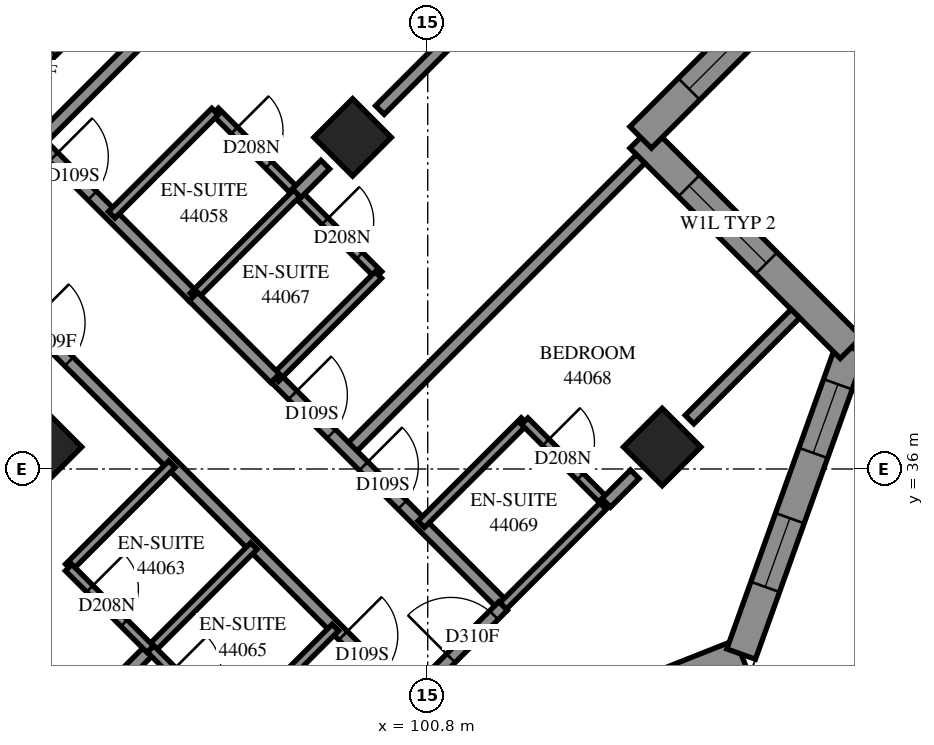
"""IFC4 building model, lengths in metres.
Left out: names, types, materials, properties, quantities, classifications, styles, units other than length and angle.
Written with IfcOpenShell. Run it as: python <this file> out.ifc"""

import sys

from ifc_helpers import new_model, si_unit, direction, frame, frame_2d, origin, origin_2d, place, context, subcontext, project, spatial, polyline, rectangle, outline, extrude, element, fill, save


model = new_model("IFC4")
c1 = context("Model", 3, precision=1e-05, world=origin(), true_north=direction((0.0, 1.0)))
c2 = subcontext(c1, "Body", "Model", "MODEL_VIEW")
j1 = project(units=[si_unit("LENGTHUNIT", "METRE"), si_unit("PLANEANGLEUNIT", "RADIAN")], contexts=[c1])
p1 = place(None, origin())
s1 = spatial("IfcSite", under=j1, at=p1, CompositionType="ELEMENT")
p2 = place(p1, origin())
s2 = spatial("IfcBuilding", under=s1, at=p2, CompositionType="ELEMENT")
p3 = place(p2, frame((0.0, 0.0, 162.6)))
s3 = spatial("IfcBuildingStorey", under=s2, at=p3, CompositionType="ELEMENT", Elevation=162.6)
for number, where, z_axis, x_axis in (
    (1, (99.565, 41.453, 0.0), (0.0, 0.0, 1.0), (0.707, -0.707, 0.0)),
    (2, (94.474, 36.362, 0.0), (0.0, 0.0, 1.0), (0.707, -0.707, 0.0)),
    (3, (104.656, 36.362, 0.0), (0.0, 0.0, 1.0), (0.707, -0.707, 0.0)),
):
    element("IfcColumn", number, at=place(p3, frame(where, z_axis=z_axis, x_axis=x_axis)), inside=s3, PredefinedType="COLUMN", context=c2, shape_type="SweptSolid", body=[
        extrude(rectangle(XDim=0.9, YDim=0.9, at=origin_2d()), origin(), (0.0, 0.0, 1.0), 3.1),
    ])
p4 = place(p3, frame((87.049, 38.695, -0.3), z_axis=(0.0, 0.0, 1.0), x_axis=(0.7071067812, 0.7071067812, 0.0)))
e4 = element("IfcWall", 4, at=p4, inside=s3, PredefinedType="SHEAR", context=c2, shape_type="SweptSolid", body=[
    extrude(rectangle(XDim=14.4, YDim=0.6, at=frame_2d((7.2, 0.0))), origin(), (0.0, 0.0, 1.0), 2.7),
])
p5 = place(p4, frame((4.55, 0.0, 0.3)))
e5 = element("IfcOpeningElement", 5, at=p5, cuts=e4, PredefinedType="OPENING", context=c2, shape_type="SweptSolid", body=[
    extrude(rectangle(XDim=1.1, YDim=2.1, at=frame_2d((0.55, 1.05))), frame((0.0, 0.31, 0.0), z_axis=(0.0, -1.0, 0.0), x_axis=(1.0, 0.0, 0.0)), (0.0, 0.0, 1.0), 0.62),
])
p6 = place(p4, frame((11.35, 0.0, 0.3)))
e6 = element("IfcOpeningElement", 6, at=p6, cuts=e4, PredefinedType="OPENING", context=c2, shape_type="SweptSolid", body=[
    extrude(rectangle(XDim=1.1, YDim=2.1, at=frame_2d((0.55, 1.05))), frame((0.0, 0.31, 0.0), z_axis=(0.0, -1.0, 0.0), x_axis=(1.0, 0.0, 0.0)), (0.0, 0.0, 1.0), 0.62),
])
p7 = place(p3, frame((100.807, 30.918, 0.0), z_axis=(0.0, 0.0, 1.0), x_axis=(0.9297320298, 0.3682368161, 0.0)))
e7 = element("IfcWall", 7, at=p7, inside=s3, PredefinedType="SOLIDWALL", context=c2, shape_type="SweptSolid", body=[
    extrude(outline(polyline([(0.108, -0.25), (5.649, -0.25), (5.423, 0.25), (-0.108, 0.25), (0.108, -0.25)])), origin(), (0.0, 0.0, 1.0), 3.1),
])
p8 = place(p7, frame((0.632, 0.0, 0.45)))
e8 = element("IfcOpeningElement", 8, at=p8, cuts=e7, PredefinedType="OPENING", context=c2, shape_type="SweptSolid", body=[
    extrude(rectangle(XDim=2.8, YDim=2.5, at=frame_2d((1.4, 1.25))), frame((0.0, 0.26, 0.0), z_axis=(0.0, -1.0, 0.0), x_axis=(1.0, 0.0, 0.0)), (0.0, 0.0, 1.0), 0.52),
])
p9 = place(p3, frame((105.954, 32.957, 0.0), z_axis=(0.0, 0.0, 1.0), x_axis=(0.3376937102, 0.9412560534, 0.0)))
e9 = element("IfcWall", 9, at=p9, inside=s3, PredefinedType="SOLIDWALL", context=c2, shape_type="SweptSolid", body=[
    extrude(outline(polyline([(-0.113, -0.25), (5.51, -0.25), (5.193, 0.25), (0.113, 0.25), (-0.113, -0.25)])), origin(), (0.0, 0.0, 1.0), 3.1),
])
p10 = place(p9, frame((1.173, 0.0, 0.45)))
e10 = element("IfcOpeningElement", 10, at=p10, cuts=e9, PredefinedType="OPENING", context=c2, shape_type="SweptSolid", body=[
    extrude(rectangle(XDim=1.2, YDim=2.5, at=frame_2d((0.6, 1.25))), frame((0.0, 0.26, 0.0), z_axis=(0.0, -1.0, 0.0), x_axis=(1.0, 0.0, 0.0)), (0.0, 0.0, 1.0), 0.52),
])
p11 = place(p9, frame((3.513, 0.0, 0.45)))
e11 = element("IfcOpeningElement", 11, at=p11, cuts=e9, PredefinedType="OPENING", context=c2, shape_type="SweptSolid", body=[
    extrude(rectangle(XDim=1.2, YDim=2.5, at=frame_2d((0.6, 1.25))), frame((0.0, 0.26, 0.0), z_axis=(0.0, -1.0, 0.0), x_axis=(1.0, 0.0, 0.0)), (0.0, 0.0, 1.0), 0.52),
])
p12 = place(p3, frame((107.761, 37.994, 0.0), z_axis=(0.0, 0.0, 1.0), x_axis=(-0.707127224, 0.7070863378, 0.0)))
e12 = element("IfcWall", 12, at=p12, inside=s3, PredefinedType="SOLIDWALL", context=c2, shape_type="SweptSolid", body=[
    extrude(outline(polyline([(-0.159, -0.25), (4.642, -0.25), (5.142, 0.25), (0.159, 0.25), (-0.159, -0.25)])), origin(), (0.0, 0.0, 1.0), 3.1),
])
p13 = place(p12, frame((1.967, 0.0, 0.6)))
e13 = element("IfcOpeningElement", 13, at=p13, cuts=e12, PredefinedType="OPENING", context=c2, shape_type="SweptSolid", body=[
    extrude(rectangle(XDim=1.8, YDim=1.9, at=frame_2d((0.9, 0.95))), frame((0.0, 0.26, 0.0), z_axis=(0.0, -1.0, 0.0), x_axis=(1.0, 0.0, 0.0)), (0.0, 0.0, 1.0), 0.52),
])
p14 = place(p3, frame((104.302, 41.453, 0.0), z_axis=(0.0, 0.0, 1.0), x_axis=(0.7071153373, 0.707098225, 0.0)))
e14 = element("IfcWall", 14, at=p14, inside=s3, PredefinedType="SOLIDWALL", context=c2, shape_type="SweptSolid", body=[
    extrude(outline(polyline([(0.25, -0.25), (6.192, -0.25), (5.495, 0.25), (-0.25, 0.25), (0.25, -0.25)])), origin(), (0.0, 0.0, 1.0), 3.1),
])
p15 = place(p14, frame((1.125, 0.0, 0.6)))
e15 = element("IfcOpeningElement", 15, at=p15, cuts=e14, PredefinedType="OPENING", context=c2, shape_type="SweptSolid", body=[
    extrude(rectangle(XDim=1.8, YDim=1.9, at=frame_2d((0.9, 0.95))), frame((0.0, 0.26, 0.0), z_axis=(0.0, -1.0, 0.0), x_axis=(1.0, 0.0, 0.0)), (0.0, 0.0, 1.0), 0.52),
])
p16 = place(p14, frame((3.973, 0.0, 0.6)))
e16 = element("IfcOpeningElement", 16, at=p16, cuts=e14, PredefinedType="OPENING", context=c2, shape_type="SweptSolid", body=[
    extrude(rectangle(XDim=1.2, YDim=1.9, at=frame_2d((0.6, 0.95))), frame((0.0, 0.26, 0.0), z_axis=(0.0, -1.0, 0.0), x_axis=(1.0, 0.0, 0.0)), (0.0, 0.0, 1.0), 0.52),
])
p17 = place(p3, frame((94.401, 41.383, 0.0), z_axis=(0.0, 0.0, 1.0), x_axis=(0.7071067812, 0.7071067812, 0.0)))
e17 = element("IfcWall", 17, at=p17, inside=s3, PredefinedType="PARTITIONING", context=c2, shape_type="SweptSolid", body=[
    extrude(rectangle(XDim=12.066, YDim=0.2, at=frame_2d((6.033, 0.0))), origin(), (0.0, 0.0, 1.0), 3.1),
])
p18 = place(p3, frame((92.209, 40.459, 0.0), z_axis=(0.0, 0.0, 1.0), x_axis=(0.7071067812, -0.7071067812, 0.0)))
e18 = element("IfcWall", 18, at=p18, inside=s3, PredefinedType="PARTITIONING", context=c2, shape_type="SweptSolid", body=[
    extrude(rectangle(XDim=11.698, YDim=0.2, at=frame_2d((5.849, 0.0))), origin(), (0.0, 0.0, 1.0), 3.1),
])
p19 = place(p18, frame((2.908, 0.0, 0.0)))
e19 = element("IfcOpeningElement", 19, at=p19, cuts=e18, PredefinedType="OPENING", context=c2, shape_type="SweptSolid", body=[
    extrude(rectangle(XDim=0.9, YDim=2.1, at=frame_2d((0.45, 1.05))), frame((0.0, 0.11, 0.0), z_axis=(0.0, -1.0, 0.0), x_axis=(1.0, 0.0, 0.0)), (0.0, 0.0, 1.0), 0.22),
])
p20 = place(p18, frame((10.181, 0.0, 0.0)))
e20 = element("IfcOpeningElement", 20, at=p20, cuts=e18, PredefinedType="OPENING", context=c2, shape_type="SweptSolid", body=[
    extrude(rectangle(XDim=0.9, YDim=2.1, at=frame_2d((0.45, 1.05))), frame((0.0, 0.11, 0.0), z_axis=(0.0, -1.0, 0.0), x_axis=(1.0, 0.0, 0.0)), (0.0, 0.0, 1.0), 0.22),
])
p21 = place(p3, frame((93.767, 42.021, 0.0), z_axis=(0.0, 0.0, 1.0), x_axis=(0.7071067812, 0.7071067812, 0.0)))
e21 = element("IfcWall", 21, at=p21, inside=s3, PredefinedType="PARTITIONING", context=c2, shape_type="SweptSolid", body=[
    extrude(rectangle(XDim=9.998, YDim=0.2, at=frame_2d((4.999, 0.0))), origin(), (0.0, 0.0, 1.0), 3.1),
])
p22 = place(p21, frame((0.196, 0.0, 0.0)))
e22 = element("IfcOpeningElement", 22, at=p22, cuts=e21, PredefinedType="OPENING", context=c2, shape_type="SweptSolid", body=[
    extrude(rectangle(XDim=1.0, YDim=2.1, at=frame_2d((0.5, 1.05))), frame((0.0, 0.11, 0.0), z_axis=(0.0, -1.0, 0.0), x_axis=(1.0, 0.0, 0.0)), (0.0, 0.0, 1.0), 0.22),
])
p23 = place(p3, frame((91.364, 28.163, 0.0), z_axis=(0.0, 0.0, 1.0), x_axis=(0.7071067812, 0.7071067812, 0.0)))
e23 = element("IfcWall", 23, at=p23, inside=s3, PredefinedType="PARTITIONING", context=c2, shape_type="SweptSolid", body=[
    extrude(rectangle(XDim=6.896, YDim=0.2, at=frame_2d((3.448, 0.0))), origin(), (0.0, 0.0, 1.0), 3.1),
])
p24 = place(p3, frame((99.494, 36.292, 0.0), z_axis=(0.0, 0.0, 1.0), x_axis=(0.7071067812, 0.7071067812, 0.0)))
e24 = element("IfcWall", 24, at=p24, inside=s3, PredefinedType="PARTITIONING", context=c2, shape_type="SweptSolid", body=[
    extrude(rectangle(XDim=6.799, YDim=0.2, at=frame_2d((3.4, 0.0))), origin(), (0.0, 0.0, 1.0), 3.1),
])
p25 = place(p3, frame((100.013, 41.903, 0.0), z_axis=(0.0, 0.0, 1.0), x_axis=(0.7071067812, 0.7071067812, 0.0)))
e25 = element("IfcWall", 25, at=p25, inside=s3, PredefinedType="PARTITIONING", context=c2, shape_type="SweptSolid", body=[
    extrude(rectangle(XDim=5.928, YDim=0.2, at=frame_2d((2.964, 0.0))), origin(), (0.0, 0.0, 1.0), 3.1),
])
p26 = place(p3, frame((98.295, 37.497, 0.0), z_axis=(0.0, 0.0, 1.0), x_axis=(0.7071067812, -0.7071067812, 0.0)))
e26 = element("IfcWall", 26, at=p26, inside=s3, PredefinedType="PARTITIONING", context=c2, shape_type="SweptSolid", body=[
    extrude(rectangle(XDim=5.301, YDim=0.2, at=frame_2d((2.65, 0.0))), origin(), (0.0, 0.0, 1.0), 3.1),
])
p27 = place(p26, frame((0.401, 0.0, 0.0)))
e27 = element("IfcOpeningElement", 27, at=p27, cuts=e26, PredefinedType="OPENING", context=c2, shape_type="SweptSolid", body=[
    extrude(rectangle(XDim=0.9, YDim=2.1, at=frame_2d((0.45, 1.05))), frame((0.0, 0.11, 0.0), z_axis=(0.0, -1.0, 0.0), x_axis=(1.0, 0.0, 0.0)), (0.0, 0.0, 1.0), 0.22),
])
p28 = place(p26, frame((2.05, 0.0, 0.0)))
e28 = element("IfcOpeningElement", 28, at=p28, cuts=e26, PredefinedType="OPENING", context=c2, shape_type="SweptSolid", body=[
    extrude(rectangle(XDim=0.9, YDim=2.1, at=frame_2d((0.45, 1.05))), frame((0.0, 0.11, 0.0), z_axis=(0.0, -1.0, 0.0), x_axis=(1.0, 0.0, 0.0)), (0.0, 0.0, 1.0), 0.22),
])
p29 = place(p3, frame((97.305, 41.881, 0.0), z_axis=(0.0, 0.0, 1.0), x_axis=(0.7067382634, -0.707475107, 0.0)))
e29 = element("IfcWall", 29, at=p29, inside=s3, PredefinedType="PARTITIONING", context=c2, shape_type="SweptSolid", body=[
    extrude(rectangle(XDim=3.8, YDim=0.15, at=frame_2d((1.9, 0.0))), origin(), (0.0, 0.0, 1.0), 3.1),
])
p30 = place(p29, frame((0.445, 0.0, 0.0)))
e30 = element("IfcOpeningElement", 30, at=p30, cuts=e29, PredefinedType="OPENING", context=c2, shape_type="SweptSolid", body=[
    extrude(rectangle(XDim=0.8, YDim=2.1, at=frame_2d((0.4, 1.05))), frame((0.0, 0.085, 0.0), z_axis=(0.0, -1.0, 0.0), x_axis=(1.0, 0.0, 0.0)), (0.0, 0.0, 1.0), 0.17),
])
p31 = place(p29, frame((2.556, 0.0, 0.0)))
e31 = element("IfcOpeningElement", 31, at=p31, cuts=e29, PredefinedType="OPENING", context=c2, shape_type="SweptSolid", body=[
    extrude(rectangle(XDim=0.8, YDim=2.1, at=frame_2d((0.4, 1.05))), frame((0.0, 0.085, 0.0), z_axis=(0.0, -1.0, 0.0), x_axis=(1.0, 0.0, 0.0)), (0.0, 0.0, 1.0), 0.17),
])
p32 = place(p3, frame((94.399, 41.379, 0.0), z_axis=(0.0, 0.0, 1.0), x_axis=(0.7071067812, -0.7071067812, 0.0)))
e32 = element("IfcWall", 32, at=p32, inside=s3, PredefinedType="PARTITIONING", context=c2, shape_type="SweptSolid", body=[
    extrude(rectangle(XDim=3.601, YDim=0.2, at=frame_2d((1.8, 0.0))), origin(), (0.0, 0.0, 1.0), 3.1),
])
p33 = place(p32, frame((0.35, 0.0, 0.0)))
e33 = element("IfcOpeningElement", 33, at=p33, cuts=e32, PredefinedType="OPENING", context=c2, shape_type="SweptSolid", body=[
    extrude(rectangle(XDim=0.9, YDim=2.1, at=frame_2d((0.45, 1.05))), frame((0.0, 0.11, 0.0), z_axis=(0.0, -1.0, 0.0), x_axis=(1.0, 0.0, 0.0)), (0.0, 0.0, 1.0), 0.22),
])
p34 = place(p3, frame((105.105, 36.813, 0.0), z_axis=(0.0, 0.0, 1.0), x_axis=(0.7071067812, 0.7071067812, 0.0)))
e34 = element("IfcWall", 34, at=p34, inside=s3, PredefinedType="PARTITIONING", context=c2, shape_type="SweptSolid", body=[
    extrude(rectangle(XDim=2.463, YDim=0.2, at=frame_2d((1.232, 0.0))), origin(), (0.0, 0.0, 1.0), 3.1),
])
for number, where, z_axis, x_axis in (
    (35, (95.603, 40.181, 0.0), (0.0, 0.0, 1.0), (0.707, 0.707, 0.0)),
    (36, (96.947, 38.837, 0.0), (0.0, 0.0, 1.0), (0.707, 0.707, 0.0)),
    (37, (97.583, 31.695, 0.0), (0.0, 0.0, 1.0), (0.707, 0.707, 0.0)),
):
    element("IfcWall", number, at=place(p3, frame(where, z_axis=z_axis, x_axis=x_axis)), inside=s3, PredefinedType="PARTITIONING", context=c2, shape_type="SweptSolid", body=[
        extrude(rectangle(XDim=2.401, YDim=0.15, at=frame_2d((1.201, 0.0))), origin(), (0.0, 0.0, 1.0), 3.1),
    ])
for number, where, z_axis, x_axis in (
    (38, (100.693, 35.093, 0.0), (0.0, 0.0, 1.0), (0.708, 0.707, 0.0)),
    (39, (96.245, 33.035, 0.0), (0.0, 0.0, 1.0), (0.707, 0.708, 0.0)),
):
    element("IfcWall", number, at=place(p3, frame(where, z_axis=z_axis, x_axis=x_axis)), inside=s3, PredefinedType="PARTITIONING", context=c2, shape_type="SweptSolid", body=[
        extrude(rectangle(XDim=2.4, YDim=0.15, at=frame_2d((1.2, 0.0))), origin(), (0.0, 0.0, 1.0), 3.1),
    ])
for number, where, z_axis, x_axis in (
    (40, (94.897, 34.383, 0.0), (0.0, 0.0, 1.0), (0.707, 0.707, 0.0)),
    (41, (98.291, 37.495, 0.0), (0.0, 0.0, 1.0), (0.707, 0.707, 0.0)),
):
    element("IfcWall", number, at=place(p3, frame(where, z_axis=z_axis, x_axis=x_axis)), inside=s3, PredefinedType="PARTITIONING", context=c2, shape_type="SweptSolid", body=[
        extrude(rectangle(XDim=2.398, YDim=0.15, at=frame_2d((1.199, 0.0))), origin(), (0.0, 0.0, 1.0), 3.1),
    ])
p35 = place(p3, frame((102.039, 33.747, 0.0), z_axis=(0.0, 0.0, 1.0), x_axis=(0.7071067812, 0.7071067812, 0.0)))
e42 = element("IfcWall", 42, at=p35, inside=s3, PredefinedType="PARTITIONING", context=c2, shape_type="SweptSolid", body=[
    extrude(rectangle(XDim=2.398, YDim=0.15, at=frame_2d((1.199, 0.0))), origin(), (0.0, 0.0, 1.0), 2.6),
])
p36 = place(p3, frame((100.483, 32.191, 0.0), z_axis=(0.0, 0.0, 1.0), x_axis=(0.7071067812, 0.7071067812, 0.0)))
e43 = element("IfcWall", 43, at=p36, inside=s3, PredefinedType="PARTITIONING", context=c2, shape_type="SweptSolid", body=[
    extrude(rectangle(XDim=2.2, YDim=0.2, at=frame_2d((1.1, 0.0))), origin(), (0.0, 0.0, 1.0), 2.6),
])
p37 = place(p36, frame((0.987, 0.0, 0.0)))
e44 = element("IfcOpeningElement", 44, at=p37, cuts=e43, PredefinedType="OPENING", context=c2, shape_type="SweptSolid", body=[
    extrude(rectangle(XDim=1.0, YDim=2.1, at=frame_2d((0.5, 1.05))), frame((0.0, 0.11, 0.0), z_axis=(0.0, -1.0, 0.0), x_axis=(1.0, 0.0, 0.0)), (0.0, 0.0, 1.0), 0.22),
])
p38 = place(p3, frame((94.895, 34.379, 0.0), z_axis=(0.0, 0.0, 1.0), x_axis=(0.7071067812, -0.7071067812, 0.0)))
e45 = element("IfcWall", 45, at=p38, inside=s3, PredefinedType="PARTITIONING", context=c2, shape_type="SweptSolid", body=[
    extrude(rectangle(XDim=1.901, YDim=0.15, at=frame_2d((0.95, 0.0))), origin(), (0.0, 0.0, 1.0), 3.1),
])
p39 = place(p38, frame((0.491, 0.0, 0.0)))
e46 = element("IfcOpeningElement", 46, at=p39, cuts=e45, PredefinedType="OPENING", context=c2, shape_type="SweptSolid", body=[
    extrude(rectangle(XDim=0.8, YDim=2.1, at=frame_2d((0.4, 1.05))), frame((0.0, 0.085, 0.0), z_axis=(0.0, -1.0, 0.0), x_axis=(1.0, 0.0, 0.0)), (0.0, 0.0, 1.0), 0.17),
])
p40 = place(p3, frame((96.946, 38.834, 0.0), z_axis=(0.0, 0.0, 1.0), x_axis=(0.7076330979, -0.7065800724, 0.0)))
e47 = element("IfcWall", 47, at=p40, inside=s3, PredefinedType="PARTITIONING", context=c2, shape_type="SweptSolid", body=[
    extrude(rectangle(XDim=1.899, YDim=0.2, at=frame_2d((0.95, 0.0))), origin(), (0.0, 0.0, 1.0), 3.1),
])
p41 = place(p3, frame((102.394, 36.786, 0.0), z_axis=(0.0, 0.0, 1.0), x_axis=(0.7065800724, -0.7076330979, 0.0)))
e48 = element("IfcWall", 48, at=p41, inside=s3, PredefinedType="PARTITIONING", context=c2, shape_type="SweptSolid", body=[
    extrude(rectangle(XDim=1.899, YDim=0.15, at=frame_2d((0.95, 0.0))), origin(), (0.0, 0.0, 1.0), 3.1),
])
p42 = place(p41, frame((0.492, 0.0, 0.0)))
e49 = element("IfcOpeningElement", 49, at=p42, cuts=e48, PredefinedType="OPENING", context=c2, shape_type="SweptSolid", body=[
    extrude(rectangle(XDim=0.8, YDim=2.1, at=frame_2d((0.4, 1.05))), frame((0.0, 0.085, 0.0), z_axis=(0.0, -1.0, 0.0), x_axis=(1.0, 0.0, 0.0)), (0.0, 0.0, 1.0), 0.17),
])
p43 = place(p3, frame((96.243, 33.039, 0.0), z_axis=(0.0, 0.0, 1.0), x_axis=(0.7065800724, -0.7076330979, 0.0)))
e50 = element("IfcWall", 50, at=p43, inside=s3, PredefinedType="PARTITIONING", context=c2, shape_type="SweptSolid", body=[
    extrude(rectangle(XDim=1.899, YDim=0.15, at=frame_2d((0.95, 0.0))), origin(), (0.0, 0.0, 1.0), 3.1),
])
p44 = place(p43, frame((0.504, 0.0, 0.0)))
e51 = element("IfcOpeningElement", 51, at=p44, cuts=e50, PredefinedType="OPENING", context=c2, shape_type="SweptSolid", body=[
    extrude(rectangle(XDim=0.8, YDim=2.1, at=frame_2d((0.4, 1.05))), frame((0.0, 0.085, 0.0), z_axis=(0.0, -1.0, 0.0), x_axis=(1.0, 0.0, 0.0)), (0.0, 0.0, 1.0), 0.17),
])
p45 = place(p3, frame((103.735, 35.443, 0.0), z_axis=(0.0, 0.0, 1.0), x_axis=(0.7071067812, 0.7071067812, 0.0)))
e52 = element("IfcWall", 52, at=p45, inside=s3, PredefinedType="PARTITIONING", context=c2, shape_type="SweptSolid", body=[
    extrude(rectangle(XDim=0.665, YDim=0.2, at=frame_2d((0.332, 0.0))), origin(), (0.0, 0.0, 1.0), 2.6),
])
p46 = place(p3, frame((98.645, 40.535, 0.0), z_axis=(0.0, 0.0, 1.0), x_axis=(0.7071067812, 0.7071067812, 0.0)))
e53 = element("IfcWall", 53, at=p46, inside=s3, PredefinedType="PARTITIONING", context=c2, shape_type="SweptSolid", body=[
    extrude(rectangle(XDim=0.665, YDim=0.2, at=frame_2d((0.332, 0.0))), origin(), (0.0, 0.0, 1.0), 3.1),
])
p47 = place(p10, origin())
e54 = element("IfcWindow", 54, at=p47, inside=s3, PartitioningType="SINGLE_PANEL", PredefinedType="WINDOW", context=c2, shape_type="SweptSolid", body=[
    extrude(rectangle(XDim=1.2, YDim=2.5, at=frame_2d((0.6, 1.25))), frame((0.0, 0.18, 0.0), z_axis=(0.0, -1.0, 0.0), x_axis=(1.0, 0.0, 0.0)), (0.0, 0.0, 1.0), 0.06),
])
fill(e10, e54)
p48 = place(p11, origin())
e55 = element("IfcWindow", 55, at=p48, inside=s3, PartitioningType="SINGLE_PANEL", PredefinedType="WINDOW", context=c2, shape_type="SweptSolid", body=[
    extrude(rectangle(XDim=1.2, YDim=2.5, at=frame_2d((0.6, 1.25))), frame((0.0, 0.18, 0.0), z_axis=(0.0, -1.0, 0.0), x_axis=(1.0, 0.0, 0.0)), (0.0, 0.0, 1.0), 0.06),
])
fill(e11, e55)
p49 = place(p13, origin())
e56 = element("IfcWindow", 56, at=p49, inside=s3, PartitioningType="SINGLE_PANEL", PredefinedType="WINDOW", context=c2, shape_type="SweptSolid", body=[
    extrude(rectangle(XDim=1.8, YDim=1.9, at=frame_2d((0.9, 0.95))), frame((0.0, 0.18, 0.0), z_axis=(0.0, -1.0, 0.0), x_axis=(1.0, 0.0, 0.0)), (0.0, 0.0, 1.0), 0.06),
])
fill(e13, e56)
p50 = place(p15, origin())
e57 = element("IfcWindow", 57, at=p50, inside=s3, PartitioningType="SINGLE_PANEL", PredefinedType="WINDOW", context=c2, shape_type="SweptSolid", body=[
    extrude(rectangle(XDim=1.8, YDim=1.9, at=frame_2d((0.9, 0.95))), frame((0.0, 0.18, 0.0), z_axis=(0.0, -1.0, 0.0), x_axis=(1.0, 0.0, 0.0)), (0.0, 0.0, 1.0), 0.06),
])
fill(e15, e57)
p51 = place(p33, origin())
e58 = element("IfcDoor", 58, at=p51, inside=s3, OperationType="SINGLE_SWING_RIGHT", PredefinedType="DOOR", context=c2, shape_type="SweptSolid", body=[
    extrude(rectangle(XDim=0.9, YDim=2.1, at=frame_2d((0.45, 1.05))), frame((0.0, 0.025, 0.0), z_axis=(0.0, -1.0, 0.0), x_axis=(1.0, 0.0, 0.0)), (0.0, 0.0, 1.0), 0.05),
])
fill(e33, e58)
p52 = place(p30, origin())
e59 = element("IfcDoor", 59, at=p52, inside=s3, OperationType="SINGLE_SWING_RIGHT", PredefinedType="DOOR", context=c2, shape_type="SweptSolid", body=[
    extrude(rectangle(XDim=0.8, YDim=2.1, at=frame_2d((0.4, 1.05))), frame((0.0, 0.025, 0.0), z_axis=(0.0, -1.0, 0.0), x_axis=(1.0, 0.0, 0.0)), (0.0, 0.0, 1.0), 0.05),
])
fill(e30, e59)
p53 = place(p19, origin())
e60 = element("IfcDoor", 60, at=p53, inside=s3, OperationType="SINGLE_SWING_LEFT", PredefinedType="DOOR", context=c2, shape_type="SweptSolid", body=[
    extrude(rectangle(XDim=0.9, YDim=2.1, at=frame_2d((0.45, 1.05))), frame((0.0, 0.025, 0.0), z_axis=(0.0, -1.0, 0.0), x_axis=(1.0, 0.0, 0.0)), (0.0, 0.0, 1.0), 0.05),
])
fill(e19, e60)
p54 = place(p39, origin())
e61 = element("IfcDoor", 61, at=p54, inside=s3, OperationType="SINGLE_SWING_RIGHT", PredefinedType="DOOR", context=c2, shape_type="SweptSolid", body=[
    extrude(rectangle(XDim=0.8, YDim=2.1, at=frame_2d((0.4, 1.05))), frame((0.0, 0.025, 0.0), z_axis=(0.0, -1.0, 0.0), x_axis=(1.0, 0.0, 0.0)), (0.0, 0.0, 1.0), 0.05),
])
fill(e46, e61)
p55 = place(p20, origin())
e62 = element("IfcDoor", 62, at=p55, inside=s3, OperationType="SINGLE_SWING_LEFT", PredefinedType="DOOR", context=c2, shape_type="SweptSolid", body=[
    extrude(rectangle(XDim=0.9, YDim=2.1, at=frame_2d((0.45, 1.05))), frame((0.0, 0.025, 0.0), z_axis=(0.0, -1.0, 0.0), x_axis=(1.0, 0.0, 0.0)), (0.0, 0.0, 1.0), 0.05),
])
fill(e20, e62)
p56 = place(p27, origin())
e63 = element("IfcDoor", 63, at=p56, inside=s3, OperationType="SINGLE_SWING_LEFT", PredefinedType="DOOR", context=c2, shape_type="SweptSolid", body=[
    extrude(rectangle(XDim=0.9, YDim=2.1, at=frame_2d((0.45, 1.05))), frame((0.0, 0.025, 0.0), z_axis=(0.0, -1.0, 0.0), x_axis=(1.0, 0.0, 0.0)), (0.0, 0.0, 1.0), 0.05),
])
fill(e27, e63)
p57 = place(p31, origin())
e64 = element("IfcDoor", 64, at=p57, inside=s3, OperationType="SINGLE_SWING_RIGHT", PredefinedType="DOOR", context=c2, shape_type="SweptSolid", body=[
    extrude(rectangle(XDim=0.8, YDim=2.1, at=frame_2d((0.4, 1.05))), frame((0.0, 0.025, 0.0), z_axis=(0.0, -1.0, 0.0), x_axis=(1.0, 0.0, 0.0)), (0.0, 0.0, 1.0), 0.05),
])
fill(e31, e64)
p58 = place(p28, origin())
e65 = element("IfcDoor", 65, at=p58, inside=s3, OperationType="SINGLE_SWING_RIGHT", PredefinedType="DOOR", context=c2, shape_type="SweptSolid", body=[
    extrude(rectangle(XDim=0.9, YDim=2.1, at=frame_2d((0.45, 1.05))), frame((0.0, 0.025, 0.0), z_axis=(0.0, -1.0, 0.0), x_axis=(1.0, 0.0, 0.0)), (0.0, 0.0, 1.0), 0.05),
])
fill(e28, e65)
p59 = place(p42, origin())
e66 = element("IfcDoor", 66, at=p59, inside=s3, OperationType="SINGLE_SWING_RIGHT", PredefinedType="DOOR", context=c2, shape_type="SweptSolid", body=[
    extrude(rectangle(XDim=0.8, YDim=2.1, at=frame_2d((0.4, 1.05))), frame((0.0, 0.025, 0.0), z_axis=(0.0, -1.0, 0.0), x_axis=(1.0, 0.0, 0.0)), (0.0, 0.0, 1.0), 0.05),
])
fill(e49, e66)
p60 = place(p37, origin())
e67 = element("IfcDoor", 67, at=p60, inside=s3, OperationType="SINGLE_SWING_RIGHT", PredefinedType="DOOR", context=c2, shape_type="SweptSolid", body=[
    extrude(rectangle(XDim=1.0, YDim=2.1, at=frame_2d((0.5, 1.05))), frame((0.0, 0.025, 0.0), z_axis=(0.0, -1.0, 0.0), x_axis=(1.0, 0.0, 0.0)), (0.0, 0.0, 1.0), 0.05),
])
fill(e44, e67)
save(model, sys.argv[1])
